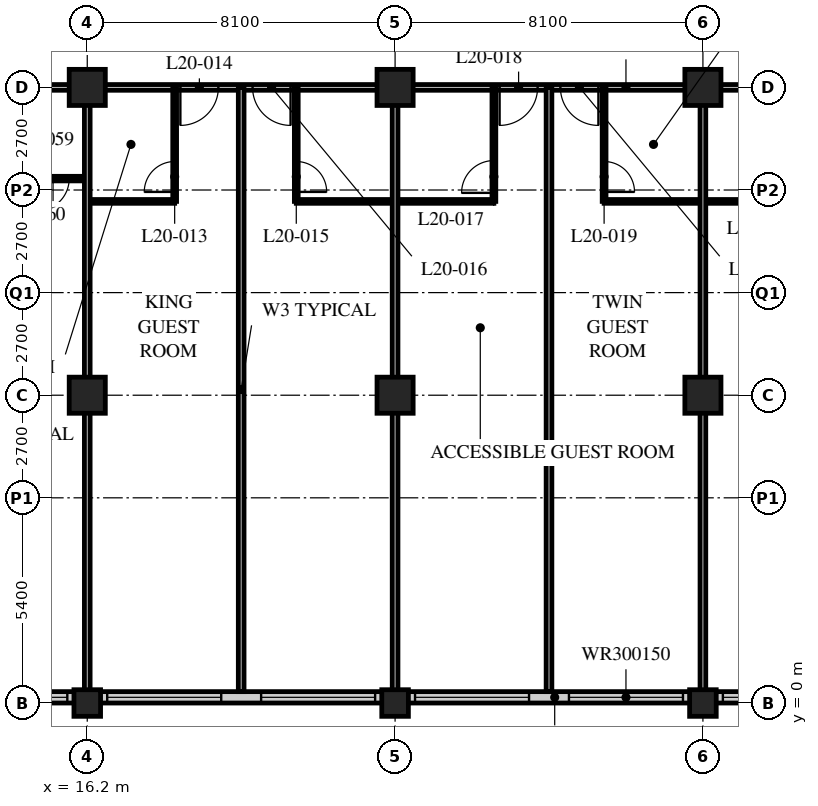
"""IFC4 building model, lengths in metres.
Left out: names, types, materials, properties, quantities, classifications, styles, units other than length and angle.
Written with IfcOpenShell. Run it as: python <this file> out.ifc"""

import sys

from ifc_helpers import new_model, si_unit, direction, frame, frame_2d, origin, origin_2d, place, context, subcontext, project, spatial, rectangle, hollow_rectangle, extrude, element, fill, save


model = new_model("IFC4")
c1 = context("Model", 3, precision=1e-05, world=origin(), true_north=direction((0.0, 1.0)))
c2 = subcontext(c1, "Body", "Model", "MODEL_VIEW")
j1 = project(units=[si_unit("LENGTHUNIT", "METRE"), si_unit("PLANEANGLEUNIT", "RADIAN")], contexts=[c1])
p1 = place(None, origin())
s1 = spatial("IfcSite", under=j1, at=p1, CompositionType="ELEMENT")
p2 = place(p1, origin())
s2 = spatial("IfcBuilding", under=s1, at=p2, CompositionType="ELEMENT")
p3 = place(p2, frame((0.0, 0.0, 80.6)))
s3 = spatial("IfcBuildingStorey", under=s2, at=p3, CompositionType="ELEMENT", Elevation=80.6)
p4 = place(p3, frame((16.2, 0.0, 0.0), z_axis=(0.0, 0.0, 1.0), x_axis=(1.0, 0.0, 0.0)))
e1 = element("IfcColumn", 1, at=p4, inside=s3, PredefinedType="COLUMN", context=c2, shape_type="SweptSolid", body=[
    extrude(hollow_rectangle(XDim=0.7, YDim=0.7, WallThickness=0.06, at=origin_2d()), origin(), (0.0, 0.0, 1.0), 3.4),
])
for number, where, z_axis, x_axis in (
    (2, (16.2, 8.1, 0.0), (0.0, 0.0, 1.0), (1.0, 0.0, 0.0)),
    (3, (16.2, 16.2, 0.0), (0.0, 0.0, 1.0), (1.0, 0.0, 0.0)),
):
    element("IfcColumn", number, at=place(p3, frame(where, z_axis=z_axis, x_axis=x_axis)), inside=s3, PredefinedType="COLUMN", context=c2, shape_type="SweptSolid", body=[
        extrude(hollow_rectangle(XDim=0.95, YDim=0.95, WallThickness=0.095, at=origin_2d()), origin(), (0.0, 0.0, 1.0), 3.4),
    ])
p5 = place(p3, frame((24.3, 0.0, 0.0), z_axis=(0.0, 0.0, 1.0), x_axis=(1.0, 0.0, 0.0)))
e4 = element("IfcColumn", 4, at=p5, inside=s3, PredefinedType="COLUMN", context=c2, shape_type="SweptSolid", body=[
    extrude(hollow_rectangle(XDim=0.7, YDim=0.7, WallThickness=0.06, at=origin_2d()), origin(), (0.0, 0.0, 1.0), 3.4),
])
for number, where, z_axis, x_axis in (
    (5, (24.3, 8.1, 0.0), (0.0, 0.0, 1.0), (1.0, 0.0, 0.0)),
    (6, (24.3, 16.2, 0.0), (0.0, 0.0, 1.0), (1.0, 0.0, 0.0)),
):
    element("IfcColumn", number, at=place(p3, frame(where, z_axis=z_axis, x_axis=x_axis)), inside=s3, PredefinedType="COLUMN", context=c2, shape_type="SweptSolid", body=[
        extrude(hollow_rectangle(XDim=0.95, YDim=0.95, WallThickness=0.095, at=origin_2d()), origin(), (0.0, 0.0, 1.0), 3.4),
    ])
p6 = place(p3, frame((32.4, 0.0, 0.0), z_axis=(0.0, 0.0, 1.0), x_axis=(1.0, 0.0, 0.0)))
e7 = element("IfcColumn", 7, at=p6, inside=s3, PredefinedType="COLUMN", context=c2, shape_type="SweptSolid", body=[
    extrude(hollow_rectangle(XDim=0.7, YDim=0.7, WallThickness=0.06, at=origin_2d()), origin(), (0.0, 0.0, 1.0), 3.4),
])
for number, where, z_axis, x_axis in (
    (8, (32.4, 8.1, 0.0), (0.0, 0.0, 1.0), (1.0, 0.0, 0.0)),
    (9, (32.4, 16.2, 0.0), (0.0, 0.0, 1.0), (1.0, 0.0, 0.0)),
):
    element("IfcColumn", number, at=place(p3, frame(where, z_axis=z_axis, x_axis=x_axis)), inside=s3, PredefinedType="COLUMN", context=c2, shape_type="SweptSolid", body=[
        extrude(hollow_rectangle(XDim=0.95, YDim=0.95, WallThickness=0.095, at=origin_2d()), origin(), (0.0, 0.0, 1.0), 3.4),
    ])
p7 = place(p3, frame((8.4, 0.15, 0.0), z_axis=(0.0, 0.0, 1.0), x_axis=(1.0, 0.0, 0.0)))
e10 = element("IfcWall", 10, at=p7, inside=s3, PredefinedType="SOLIDWALL", context=c2, shape_type="SweptSolid", body=[
    extrude(rectangle(XDim=40.2, YDim=0.3, at=frame_2d((20.1, 0.0))), origin(), (0.0, 0.0, 1.0), 3.19),
])
p8 = place(p7, frame((0.225, 0.0, 0.9)))
e11 = element("IfcOpeningElement", 11, at=p8, cuts=e10, PredefinedType="OPENING", context=c2, shape_type="SweptSolid", body=[
    extrude(rectangle(XDim=3.0, YDim=1.5, at=frame_2d((1.5, 0.75))), frame((0.0, 0.16, 0.0), z_axis=(0.0, -1.0, 0.0), x_axis=(1.0, 0.0, 0.0)), (0.0, 0.0, 1.0), 0.32),
])
p9 = place(p7, frame((4.275, 0.0, 0.9)))
e12 = element("IfcOpeningElement", 12, at=p9, cuts=e10, PredefinedType="OPENING", context=c2, shape_type="SweptSolid", body=[
    extrude(rectangle(XDim=3.0, YDim=1.5, at=frame_2d((1.5, 0.75))), frame((0.0, 0.16, 0.0), z_axis=(0.0, -1.0, 0.0), x_axis=(1.0, 0.0, 0.0)), (0.0, 0.0, 1.0), 0.32),
])
p10 = place(p7, frame((8.325, 0.0, 0.9)))
e13 = element("IfcOpeningElement", 13, at=p10, cuts=e10, PredefinedType="OPENING", context=c2, shape_type="SweptSolid", body=[
    extrude(rectangle(XDim=3.0, YDim=1.5, at=frame_2d((1.5, 0.75))), frame((0.0, 0.16, 0.0), z_axis=(0.0, -1.0, 0.0), x_axis=(1.0, 0.0, 0.0)), (0.0, 0.0, 1.0), 0.32),
])
p11 = place(p7, frame((12.375, 0.0, 0.9)))
e14 = element("IfcOpeningElement", 14, at=p11, cuts=e10, PredefinedType="OPENING", context=c2, shape_type="SweptSolid", body=[
    extrude(rectangle(XDim=3.0, YDim=1.5, at=frame_2d((1.5, 0.75))), frame((0.0, 0.16, 0.0), z_axis=(0.0, -1.0, 0.0), x_axis=(1.0, 0.0, 0.0)), (0.0, 0.0, 1.0), 0.32),
])
p12 = place(p7, frame((16.425, 0.0, 0.9)))
e15 = element("IfcOpeningElement", 15, at=p12, cuts=e10, PredefinedType="OPENING", context=c2, shape_type="SweptSolid", body=[
    extrude(rectangle(XDim=3.0, YDim=1.5, at=frame_2d((1.5, 0.75))), frame((0.0, 0.16, 0.0), z_axis=(0.0, -1.0, 0.0), x_axis=(1.0, 0.0, 0.0)), (0.0, 0.0, 1.0), 0.32),
])
p13 = place(p7, frame((20.475, 0.0, 0.9)))
e16 = element("IfcOpeningElement", 16, at=p13, cuts=e10, PredefinedType="OPENING", context=c2, shape_type="SweptSolid", body=[
    extrude(rectangle(XDim=3.0, YDim=1.5, at=frame_2d((1.5, 0.75))), frame((0.0, 0.16, 0.0), z_axis=(0.0, -1.0, 0.0), x_axis=(1.0, 0.0, 0.0)), (0.0, 0.0, 1.0), 0.32),
])
p14 = place(p7, frame((24.525, 0.0, 0.9)))
e17 = element("IfcOpeningElement", 17, at=p14, cuts=e10, PredefinedType="OPENING", context=c2, shape_type="SweptSolid", body=[
    extrude(rectangle(XDim=3.0, YDim=1.5, at=frame_2d((1.5, 0.75))), frame((0.0, 0.16, 0.0), z_axis=(0.0, -1.0, 0.0), x_axis=(1.0, 0.0, 0.0)), (0.0, 0.0, 1.0), 0.32),
])
p15 = place(p7, frame((28.575, 0.0, 0.9)))
e18 = element("IfcOpeningElement", 18, at=p15, cuts=e10, PredefinedType="OPENING", context=c2, shape_type="SweptSolid", body=[
    extrude(rectangle(XDim=3.0, YDim=1.5, at=frame_2d((1.5, 0.75))), frame((0.0, 0.16, 0.0), z_axis=(0.0, -1.0, 0.0), x_axis=(1.0, 0.0, 0.0)), (0.0, 0.0, 1.0), 0.32),
])
p16 = place(p7, frame((32.625, 0.0, 0.9)))
e19 = element("IfcOpeningElement", 19, at=p16, cuts=e10, PredefinedType="OPENING", context=c2, shape_type="SweptSolid", body=[
    extrude(rectangle(XDim=3.0, YDim=1.5, at=frame_2d((1.5, 0.75))), frame((0.0, 0.16, 0.0), z_axis=(0.0, -1.0, 0.0), x_axis=(1.0, 0.0, 0.0)), (0.0, 0.0, 1.0), 0.32),
])
p17 = place(p7, frame((36.675, 0.0, 0.9)))
e20 = element("IfcOpeningElement", 20, at=p17, cuts=e10, PredefinedType="OPENING", context=c2, shape_type="SweptSolid", body=[
    extrude(rectangle(XDim=3.0, YDim=1.5, at=frame_2d((1.5, 0.75))), frame((0.0, 0.16, 0.0), z_axis=(0.0, -1.0, 0.0), x_axis=(1.0, 0.0, 0.0)), (0.0, 0.0, 1.0), 0.32),
])
p18 = place(p3, frame((12.15, 16.2, 0.0), z_axis=(0.0, 0.0, 1.0), x_axis=(1.0, 0.0, 0.0)))
e21 = element("IfcWall", 21, at=p18, inside=s3, PredefinedType="PARTITIONING", context=c2, shape_type="SweptSolid", body=[
    extrude(rectangle(XDim=36.45, YDim=0.15, at=frame_2d((18.225, 0.0))), origin(), (0.0, 0.0, 1.0), 2.428),
])
p19 = place(p18, frame((6.5, 0.0, 0.0)))
e22 = element("IfcOpeningElement", 22, at=p19, cuts=e21, PredefinedType="OPENING", context=c2, shape_type="SweptSolid", body=[
    extrude(rectangle(XDim=1.0, YDim=2.1, at=frame_2d((0.5, 1.05))), frame((0.0, 0.085, 0.0), z_axis=(0.0, -1.0, 0.0), x_axis=(1.0, 0.0, 0.0)), (0.0, 0.0, 1.0), 0.17),
])
p20 = place(p18, frame((8.4, 0.0, 0.0)))
e23 = element("IfcOpeningElement", 23, at=p20, cuts=e21, PredefinedType="OPENING", context=c2, shape_type="SweptSolid", body=[
    extrude(rectangle(XDim=1.0, YDim=2.1, at=frame_2d((0.5, 1.05))), frame((0.0, 0.085, 0.0), z_axis=(0.0, -1.0, 0.0), x_axis=(1.0, 0.0, 0.0)), (0.0, 0.0, 1.0), 0.17),
])
p21 = place(p18, frame((14.9, 0.0, 0.0)))
e24 = element("IfcOpeningElement", 24, at=p21, cuts=e21, PredefinedType="OPENING", context=c2, shape_type="SweptSolid", body=[
    extrude(rectangle(XDim=1.0, YDim=2.1, at=frame_2d((0.5, 1.05))), frame((0.0, 0.085, 0.0), z_axis=(0.0, -1.0, 0.0), x_axis=(1.0, 0.0, 0.0)), (0.0, 0.0, 1.0), 0.17),
])
p22 = place(p18, frame((16.5, 0.0, 0.0)))
e25 = element("IfcOpeningElement", 25, at=p22, cuts=e21, PredefinedType="OPENING", context=c2, shape_type="SweptSolid", body=[
    extrude(rectangle(XDim=1.0, YDim=2.1, at=frame_2d((0.5, 1.05))), frame((0.0, 0.085, 0.0), z_axis=(0.0, -1.0, 0.0), x_axis=(1.0, 0.0, 0.0)), (0.0, 0.0, 1.0), 0.17),
])
p23 = place(p18, frame((22.7, 0.0, 0.0)))
e26 = element("IfcOpeningElement", 26, at=p23, cuts=e21, PredefinedType="OPENING", context=c2, shape_type="SweptSolid", body=[
    extrude(rectangle(XDim=1.0, YDim=2.1, at=frame_2d((0.5, 1.05))), frame((0.0, 0.085, 0.0), z_axis=(0.0, -1.0, 0.0), x_axis=(1.0, 0.0, 0.0)), (0.0, 0.0, 1.0), 0.17),
])
p24 = place(p18, frame((24.9, 0.0, 0.0)))
e27 = element("IfcOpeningElement", 27, at=p24, cuts=e21, PredefinedType="OPENING", context=c2, shape_type="SweptSolid", body=[
    extrude(rectangle(XDim=1.0, YDim=2.1, at=frame_2d((0.5, 1.05))), frame((0.0, 0.085, 0.0), z_axis=(0.0, -1.0, 0.0), x_axis=(1.0, 0.0, 0.0)), (0.0, 0.0, 1.0), 0.17),
])
p25 = place(p18, frame((30.8, 0.0, 0.0)))
e28 = element("IfcOpeningElement", 28, at=p25, cuts=e21, PredefinedType="OPENING", context=c2, shape_type="SweptSolid", body=[
    extrude(rectangle(XDim=1.0, YDim=2.1, at=frame_2d((0.5, 1.05))), frame((0.0, 0.085, 0.0), z_axis=(0.0, -1.0, 0.0), x_axis=(1.0, 0.0, 0.0)), (0.0, 0.0, 1.0), 0.17),
])
p26 = place(p18, frame((1.525, 0.0, 0.0)))
e29 = element("IfcOpeningElement", 29, at=p26, cuts=e21, PredefinedType="OPENING", context=c2, shape_type="SweptSolid", body=[
    extrude(rectangle(XDim=1.0, YDim=2.1, at=frame_2d((0.5, 1.05))), frame((0.0, 0.085, 0.0), z_axis=(0.0, -1.0, 0.0), x_axis=(1.0, 0.0, 0.0)), (0.0, 0.0, 1.0), 0.17),
])
p27 = place(p18, frame((33.925, 0.0, 0.0)))
e30 = element("IfcOpeningElement", 30, at=p27, cuts=e21, PredefinedType="OPENING", context=c2, shape_type="SweptSolid", body=[
    extrude(rectangle(XDim=1.0, YDim=2.1, at=frame_2d((0.5, 1.05))), frame((0.0, 0.085, 0.0), z_axis=(0.0, -1.0, 0.0), x_axis=(1.0, 0.0, 0.0)), (0.0, 0.0, 1.0), 0.17),
])
p28 = place(p3, frame((16.2, 13.2, 0.0), z_axis=(0.0, 0.0, 1.0), x_axis=(1.0, 0.0, 0.0)))
e31 = element("IfcWall", 31, at=p28, inside=s3, PredefinedType="PARTITIONING", context=c2, shape_type="SweptSolid", body=[
    extrude(rectangle(XDim=2.3, YDim=0.1, at=frame_2d((1.15, 0.0))), origin(), (0.0, 0.0, 1.0), 3.19),
])
p29 = place(p3, frame((18.5, 16.2, 0.0), z_axis=(0.0, 0.0, 1.0), x_axis=(0.0, -1.0, 0.0)))
e32 = element("IfcWall", 32, at=p29, inside=s3, PredefinedType="PARTITIONING", context=c2, shape_type="SweptSolid", body=[
    extrude(rectangle(XDim=3.0, YDim=0.1, at=frame_2d((1.5, 0.0))), origin(), (0.0, 0.0, 1.0), 3.19),
])
p30 = place(p29, frame((1.95, 0.0, 0.0)))
e33 = element("IfcOpeningElement", 33, at=p30, cuts=e32, PredefinedType="OPENING", context=c2, shape_type="SweptSolid", body=[
    extrude(rectangle(XDim=0.8, YDim=2.1, at=frame_2d((0.4, 1.05))), frame((0.0, 0.06, 0.0), z_axis=(0.0, -1.0, 0.0), x_axis=(1.0, 0.0, 0.0)), (0.0, 0.0, 1.0), 0.12),
])
p31 = place(p3, frame((20.25, 16.2, 0.0), z_axis=(0.0, 0.0, 1.0), x_axis=(0.0, -1.0, 0.0)))
e34 = element("IfcWall", 34, at=p31, inside=s3, PredefinedType="PARTITIONING", context=c2, shape_type="SweptSolid", body=[
    extrude(rectangle(XDim=15.9, YDim=0.15, at=frame_2d((7.95, 0.0))), origin(), (0.0, 0.0, 1.0), 3.19),
])
p32 = place(p3, frame((21.7, 13.2, 0.0), z_axis=(0.0, 0.0, 1.0), x_axis=(1.0, 0.0, 0.0)))
e35 = element("IfcWall", 35, at=p32, inside=s3, PredefinedType="PARTITIONING", context=c2, shape_type="SweptSolid", body=[
    extrude(rectangle(XDim=5.2, YDim=0.1, at=frame_2d((2.6, 0.0))), origin(), (0.0, 0.0, 1.0), 3.19),
])
p33 = place(p3, frame((21.7, 16.2, 0.0), z_axis=(0.0, 0.0, 1.0), x_axis=(0.0, -1.0, 0.0)))
e36 = element("IfcWall", 36, at=p33, inside=s3, PredefinedType="PARTITIONING", context=c2, shape_type="SweptSolid", body=[
    extrude(rectangle(XDim=3.0, YDim=0.1, at=frame_2d((1.5, 0.0))), origin(), (0.0, 0.0, 1.0), 3.19),
])
p34 = place(p33, frame((1.95, 0.0, 0.0)))
e37 = element("IfcOpeningElement", 37, at=p34, cuts=e36, PredefinedType="OPENING", context=c2, shape_type="SweptSolid", body=[
    extrude(rectangle(XDim=0.8, YDim=2.1, at=frame_2d((0.4, 1.05))), frame((0.0, 0.06, 0.0), z_axis=(0.0, -1.0, 0.0), x_axis=(1.0, 0.0, 0.0)), (0.0, 0.0, 1.0), 0.12),
])
p35 = place(p3, frame((24.3, 16.2, 0.0), z_axis=(0.0, 0.0, 1.0), x_axis=(0.0, -1.0, 0.0)))
e38 = element("IfcWall", 38, at=p35, inside=s3, PredefinedType="PARTITIONING", context=c2, shape_type="SweptSolid", body=[
    extrude(rectangle(XDim=15.9, YDim=0.15, at=frame_2d((7.95, 0.0))), origin(), (0.0, 0.0, 1.0), 2.428),
])
p36 = place(p3, frame((26.9, 16.2, 0.0), z_axis=(0.0, 0.0, 1.0), x_axis=(0.0, -1.0, 0.0)))
e39 = element("IfcWall", 39, at=p36, inside=s3, PredefinedType="PARTITIONING", context=c2, shape_type="SweptSolid", body=[
    extrude(rectangle(XDim=3.0, YDim=0.1, at=frame_2d((1.5, 0.0))), origin(), (0.0, 0.0, 1.0), 3.19),
])
p37 = place(p36, frame((1.925, 0.0, 0.0)))
e40 = element("IfcOpeningElement", 40, at=p37, cuts=e39, PredefinedType="OPENING", context=c2, shape_type="SweptSolid", body=[
    extrude(rectangle(XDim=0.85, YDim=2.1, at=frame_2d((0.425, 1.05))), frame((0.0, 0.06, 0.0), z_axis=(0.0, -1.0, 0.0), x_axis=(1.0, 0.0, 0.0)), (0.0, 0.0, 1.0), 0.12),
])
p38 = place(p3, frame((28.35, 16.2, 0.0), z_axis=(0.0, 0.0, 1.0), x_axis=(0.0, -1.0, 0.0)))
e41 = element("IfcWall", 41, at=p38, inside=s3, PredefinedType="PARTITIONING", context=c2, shape_type="SweptSolid", body=[
    extrude(rectangle(XDim=15.9, YDim=0.15, at=frame_2d((7.95, 0.0))), origin(), (0.0, 0.0, 1.0), 3.19),
])
p39 = place(p3, frame((29.8, 13.2, 0.0), z_axis=(0.0, 0.0, 1.0), x_axis=(1.0, 0.0, 0.0)))
e42 = element("IfcWall", 42, at=p39, inside=s3, PredefinedType="PARTITIONING", context=c2, shape_type="SweptSolid", body=[
    extrude(rectangle(XDim=4.9, YDim=0.1, at=frame_2d((2.45, 0.0))), origin(), (0.0, 0.0, 1.0), 3.19),
])
p40 = place(p3, frame((29.8, 16.2, 0.0), z_axis=(0.0, 0.0, 1.0), x_axis=(0.0, -1.0, 0.0)))
e43 = element("IfcWall", 43, at=p40, inside=s3, PredefinedType="PARTITIONING", context=c2, shape_type="SweptSolid", body=[
    extrude(rectangle(XDim=3.0, YDim=0.1, at=frame_2d((1.5, 0.0))), origin(), (0.0, 0.0, 1.0), 3.19),
])
p41 = place(p40, frame((1.95, 0.0, 0.0)))
e44 = element("IfcOpeningElement", 44, at=p41, cuts=e43, PredefinedType="OPENING", context=c2, shape_type="SweptSolid", body=[
    extrude(rectangle(XDim=0.8, YDim=2.1, at=frame_2d((0.4, 1.05))), frame((0.0, 0.06, 0.0), z_axis=(0.0, -1.0, 0.0), x_axis=(1.0, 0.0, 0.0)), (0.0, 0.0, 1.0), 0.12),
])
p42 = place(p3, frame((32.4, 16.2, 0.0), z_axis=(0.0, 0.0, 1.0), x_axis=(0.0, -1.0, 0.0)))
e45 = element("IfcWall", 45, at=p42, inside=s3, PredefinedType="PARTITIONING", context=c2, shape_type="SweptSolid", body=[
    extrude(rectangle(XDim=15.9, YDim=0.15, at=frame_2d((7.95, 0.0))), origin(), (0.0, 0.0, 1.0), 2.428),
])
p43 = place(p3, frame((8.15, 13.8, 0.0), z_axis=(0.0, 0.0, 1.0), x_axis=(1.0, 0.0, 0.0)))
e46 = element("IfcWall", 46, at=p43, inside=s3, PredefinedType="PARTITIONING", context=c2, shape_type="SweptSolid", body=[
    extrude(rectangle(XDim=8.05, YDim=0.12, at=frame_2d((4.025, 0.0))), origin(), (0.0, 0.0, 1.0), 3.19),
])
p44 = place(p43, frame((6.725, 0.0, 0.0)))
e47 = element("IfcOpeningElement", 47, at=p44, cuts=e46, PredefinedType="OPENING", context=c2, shape_type="SweptSolid", body=[
    extrude(rectangle(XDim=0.85, YDim=2.1, at=frame_2d((0.425, 1.05))), frame((0.0, 0.07, 0.0), z_axis=(0.0, -1.0, 0.0), x_axis=(1.0, 0.0, 0.0)), (0.0, 0.0, 1.0), 0.14),
])
p45 = place(p43, frame((2.875, 0.0, 0.0)))
e48 = element("IfcOpeningElement", 48, at=p45, cuts=e46, PredefinedType="OPENING", context=c2, shape_type="SweptSolid", body=[
    extrude(rectangle(XDim=0.85, YDim=2.1, at=frame_2d((0.425, 1.05))), frame((0.0, 0.07, 0.0), z_axis=(0.0, -1.0, 0.0), x_axis=(1.0, 0.0, 0.0)), (0.0, 0.0, 1.0), 0.14),
])
p46 = place(p3, frame((16.2, 16.2, 0.0), z_axis=(0.0, 0.0, 1.0), x_axis=(0.0, -1.0, 0.0)))
e49 = element("IfcWall", 49, at=p46, inside=s3, PredefinedType="PARTITIONING", context=c2, shape_type="SweptSolid", body=[
    extrude(rectangle(XDim=15.9, YDim=0.15, at=frame_2d((7.95, 0.0))), origin(), (0.0, 0.0, 1.0), 2.428),
])
p47 = place(p9, origin())
e50 = element("IfcWindow", 50, at=p47, inside=s3, PartitioningType="SINGLE_PANEL", PredefinedType="WINDOW", context=c2, shape_type="SweptSolid", body=[
    extrude(rectangle(XDim=3.0, YDim=1.5, at=frame_2d((1.5, 0.75))), frame((0.0, 0.03, 0.0), z_axis=(0.0, -1.0, 0.0), x_axis=(1.0, 0.0, 0.0)), (0.0, 0.0, 1.0), 0.06),
])
fill(e12, e50)
p48 = place(p10, origin())
e51 = element("IfcWindow", 51, at=p48, inside=s3, PartitioningType="SINGLE_PANEL", PredefinedType="WINDOW", context=c2, shape_type="SweptSolid", body=[
    extrude(rectangle(XDim=3.0, YDim=1.5, at=frame_2d((1.5, 0.75))), frame((0.0, 0.03, 0.0), z_axis=(0.0, -1.0, 0.0), x_axis=(1.0, 0.0, 0.0)), (0.0, 0.0, 1.0), 0.06),
])
fill(e13, e51)
p49 = place(p11, origin())
e52 = element("IfcWindow", 52, at=p49, inside=s3, PartitioningType="SINGLE_PANEL", PredefinedType="WINDOW", context=c2, shape_type="SweptSolid", body=[
    extrude(rectangle(XDim=3.0, YDim=1.5, at=frame_2d((1.5, 0.75))), frame((0.0, 0.03, 0.0), z_axis=(0.0, -1.0, 0.0), x_axis=(1.0, 0.0, 0.0)), (0.0, 0.0, 1.0), 0.06),
])
fill(e14, e52)
p50 = place(p12, origin())
e53 = element("IfcWindow", 53, at=p50, inside=s3, PartitioningType="SINGLE_PANEL", PredefinedType="WINDOW", context=c2, shape_type="SweptSolid", body=[
    extrude(rectangle(XDim=3.0, YDim=1.5, at=frame_2d((1.5, 0.75))), frame((0.0, 0.03, 0.0), z_axis=(0.0, -1.0, 0.0), x_axis=(1.0, 0.0, 0.0)), (0.0, 0.0, 1.0), 0.06),
])
fill(e15, e53)
p51 = place(p13, origin())
e54 = element("IfcWindow", 54, at=p51, inside=s3, PartitioningType="SINGLE_PANEL", PredefinedType="WINDOW", context=c2, shape_type="SweptSolid", body=[
    extrude(rectangle(XDim=3.0, YDim=1.5, at=frame_2d((1.5, 0.75))), frame((0.0, 0.03, 0.0), z_axis=(0.0, -1.0, 0.0), x_axis=(1.0, 0.0, 0.0)), (0.0, 0.0, 1.0), 0.06),
])
fill(e16, e54)
p52 = place(p14, origin())
e55 = element("IfcWindow", 55, at=p52, inside=s3, PartitioningType="SINGLE_PANEL", PredefinedType="WINDOW", context=c2, shape_type="SweptSolid", body=[
    extrude(rectangle(XDim=3.0, YDim=1.5, at=frame_2d((1.5, 0.75))), frame((0.0, 0.03, 0.0), z_axis=(0.0, -1.0, 0.0), x_axis=(1.0, 0.0, 0.0)), (0.0, 0.0, 1.0), 0.06),
])
fill(e17, e55)
p53 = place(p30, origin())
e56 = element("IfcDoor", 56, at=p53, inside=s3, OperationType="SINGLE_SWING_LEFT", PredefinedType="DOOR", context=c2, shape_type="SweptSolid", body=[
    extrude(rectangle(XDim=0.8, YDim=2.1, at=frame_2d((0.4, 1.05))), frame((0.0, 0.025, 0.0), z_axis=(0.0, -1.0, 0.0), x_axis=(1.0, 0.0, 0.0)), (0.0, 0.0, 1.0), 0.05),
])
fill(e33, e56)
p54 = place(p19, origin())
e57 = element("IfcDoor", 57, at=p54, inside=s3, OperationType="SINGLE_SWING_RIGHT", PredefinedType="DOOR", context=c2, shape_type="SweptSolid", body=[
    extrude(rectangle(XDim=1.0, YDim=2.1, at=frame_2d((0.5, 1.05))), frame((0.0, 0.025, 0.0), z_axis=(0.0, -1.0, 0.0), x_axis=(1.0, 0.0, 0.0)), (0.0, 0.0, 1.0), 0.05),
])
fill(e22, e57)
p55 = place(p34, origin())
e58 = element("IfcDoor", 58, at=p55, inside=s3, OperationType="SINGLE_SWING_RIGHT", PredefinedType="DOOR", context=c2, shape_type="SweptSolid", body=[
    extrude(rectangle(XDim=0.8, YDim=2.1, at=frame_2d((0.4, 1.05))), frame((0.0, 0.025, 0.0), z_axis=(0.0, -1.0, 0.0), x_axis=(1.0, 0.0, 0.0)), (0.0, 0.0, 1.0), 0.05),
])
fill(e37, e58)
p56 = place(p20, origin())
e59 = element("IfcDoor", 59, at=p56, inside=s3, OperationType="SINGLE_SWING_LEFT", PredefinedType="DOOR", context=c2, shape_type="SweptSolid", body=[
    extrude(rectangle(XDim=1.0, YDim=2.1, at=frame_2d((0.5, 1.05))), frame((0.0, 0.025, 0.0), z_axis=(0.0, -1.0, 0.0), x_axis=(1.0, 0.0, 0.0)), (0.0, 0.0, 1.0), 0.05),
])
fill(e23, e59)
p57 = place(p37, origin())
e60 = element("IfcDoor", 60, at=p57, inside=s3, OperationType="SINGLE_SWING_LEFT", PredefinedType="DOOR", context=c2, shape_type="SweptSolid", body=[
    extrude(rectangle(XDim=0.85, YDim=2.1, at=frame_2d((0.425, 1.05))), frame((0.0, 0.025, 0.0), z_axis=(0.0, -1.0, 0.0), x_axis=(1.0, 0.0, 0.0)), (0.0, 0.0, 1.0), 0.05),
])
fill(e40, e60)
p58 = place(p21, origin())
e61 = element("IfcDoor", 61, at=p58, inside=s3, OperationType="SINGLE_SWING_RIGHT", PredefinedType="DOOR", context=c2, shape_type="SweptSolid", body=[
    extrude(rectangle(XDim=1.0, YDim=2.1, at=frame_2d((0.5, 1.05))), frame((0.0, 0.025, 0.0), z_axis=(0.0, -1.0, 0.0), x_axis=(1.0, 0.0, 0.0)), (0.0, 0.0, 1.0), 0.05),
])
fill(e24, e61)
p59 = place(p41, origin())
e62 = element("IfcDoor", 62, at=p59, inside=s3, OperationType="SINGLE_SWING_RIGHT", PredefinedType="DOOR", context=c2, shape_type="SweptSolid", body=[
    extrude(rectangle(XDim=0.8, YDim=2.1, at=frame_2d((0.4, 1.05))), frame((0.0, 0.025, 0.0), z_axis=(0.0, -1.0, 0.0), x_axis=(1.0, 0.0, 0.0)), (0.0, 0.0, 1.0), 0.05),
])
fill(e44, e62)
p60 = place(p22, origin())
e63 = element("IfcDoor", 63, at=p60, inside=s3, OperationType="SINGLE_SWING_LEFT", PredefinedType="DOOR", context=c2, shape_type="SweptSolid", body=[
    extrude(rectangle(XDim=1.0, YDim=2.1, at=frame_2d((0.5, 1.05))), frame((0.0, 0.025, 0.0), z_axis=(0.0, -1.0, 0.0), x_axis=(1.0, 0.0, 0.0)), (0.0, 0.0, 1.0), 0.05),
])
fill(e25, e63)
p61 = place(p44, origin())
e64 = element("IfcDoor", 64, at=p61, inside=s3, OperationType="SINGLE_SWING_RIGHT", PredefinedType="DOOR", context=c2, shape_type="SweptSolid", body=[
    extrude(rectangle(XDim=0.85, YDim=2.1, at=frame_2d((0.425, 1.05))), frame((0.0, 0.025, 0.0), z_axis=(0.0, -1.0, 0.0), x_axis=(1.0, 0.0, 0.0)), (0.0, 0.0, 1.0), 0.05),
])
fill(e47, e64)
save(model, sys.argv[1])
